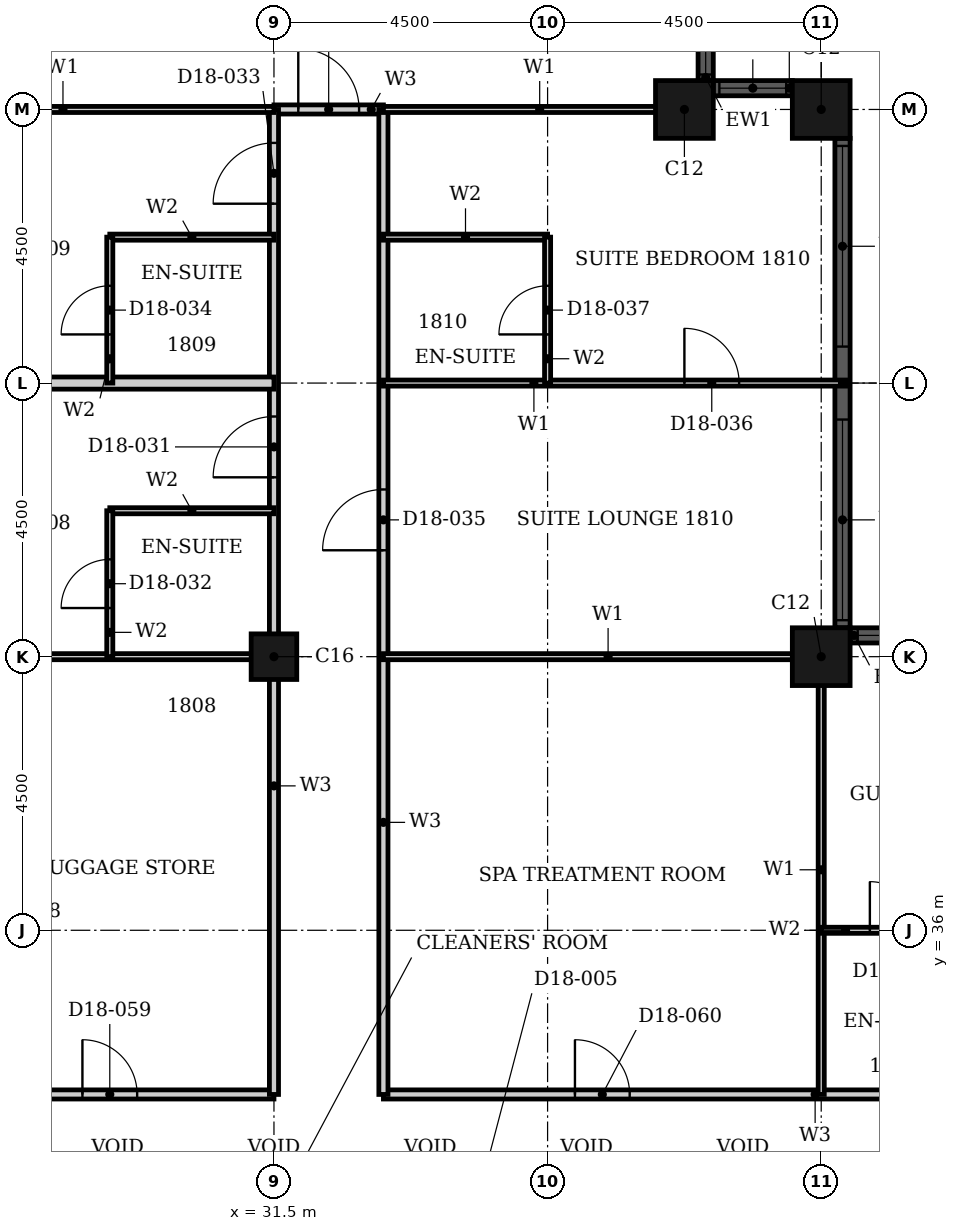
"""IFC4 building model, lengths in metres.
Left out: names, types, materials, properties, quantities, classifications, styles, units other than length and angle.
Written with IfcOpenShell. Run it as: python <this file> out.ifc"""

import sys

from ifc_helpers import new_model, si_unit, direction, frame, frame_2d, origin, origin_2d, place, context, subcontext, project, spatial, rectangle, hollow_rectangle, extrude, element, fill, save


model = new_model("IFC4")
c1 = context("Model", 3, precision=1e-05, world=origin(), true_north=direction((0.0, 1.0)))
c2 = subcontext(c1, "Body", "Model", "MODEL_VIEW")
j1 = project(units=[si_unit("LENGTHUNIT", "METRE"), si_unit("PLANEANGLEUNIT", "RADIAN")], contexts=[c1])
p1 = place(None, origin())
s1 = spatial("IfcSite", under=j1, at=p1, CompositionType="ELEMENT")
p2 = place(p1, origin())
s2 = spatial("IfcBuilding", under=s1, at=p2, CompositionType="ELEMENT")
p3 = place(p2, frame((0.0, 0.0, 78.0)))
s3 = spatial("IfcBuildingStorey", under=s2, at=p3, CompositionType="ELEMENT", Elevation=78.0)
for number, where, z_axis, x_axis in (
    (1, (40.5, 40.5, 0.0), (0.0, 0.0, 1.0), (1.0, 0.0, 0.0)),
    (2, (40.5, 49.5, 0.0), (0.0, 0.0, 1.0), (1.0, 0.0, 0.0)),
    (3, (38.25, 49.5, 0.0), (0.0, 0.0, 1.0), (1.0, 0.0, 0.0)),
):
    element("IfcColumn", number, at=place(p3, frame(where, z_axis=z_axis, x_axis=x_axis)), inside=s3, PredefinedType="COLUMN", context=c2, shape_type="SweptSolid", body=[
        extrude(hollow_rectangle(XDim=0.95, YDim=0.95, WallThickness=0.03, at=origin_2d()), origin(), (0.0, 0.0, 1.0), 3.6),
    ])
p4 = place(p3, frame((31.5, 40.5, 0.0), z_axis=(0.0, 0.0, 1.0), x_axis=(1.0, 0.0, 0.0)))
e4 = element("IfcColumn", 4, at=p4, inside=s3, PredefinedType="COLUMN", context=c2, shape_type="SweptSolid", body=[
    extrude(hollow_rectangle(XDim=0.75, YDim=0.75, WallThickness=0.024, at=origin_2d()), origin(), (0.0, 0.0, 1.0), 3.6),
])
p5 = place(p3, frame((44.525, 40.85, 0.0), z_axis=(0.0, 0.0, 1.0), x_axis=(-1.0, 0.0, 0.0)))
e5 = element("IfcWall", 5, at=p5, inside=s3, PredefinedType="SOLIDWALL", context=c2, shape_type="SweptSolid", body=[
    extrude(rectangle(XDim=3.55, YDim=0.25, at=frame_2d((1.775, 0.0))), origin(), (0.0, 0.0, 1.0), 3.6),
])
p6 = place(p5, frame((0.125, 0.0, 0.9)))
e6 = element("IfcOpeningElement", 6, at=p6, cuts=e5, PredefinedType="OPENING", context=c2, shape_type="SweptSolid", body=[
    extrude(rectangle(XDim=3.3, YDim=2.08, at=frame_2d((1.65, 1.04))), frame((0.0, 0.135, 0.0), z_axis=(0.0, -1.0, 0.0), x_axis=(1.0, 0.0, 0.0)), (0.0, 0.0, 1.0), 0.27),
])
p7 = place(p3, frame((40.85, 40.975, 0.0), z_axis=(0.0, 0.0, 1.0), x_axis=(0.0, 1.0, 0.0)))
e7 = element("IfcWall", 7, at=p7, inside=s3, PredefinedType="SOLIDWALL", context=c2, shape_type="SweptSolid", body=[
    extrude(rectangle(XDim=8.05, YDim=0.25, at=frame_2d((4.025, 0.0))), origin(), (0.0, 0.0, 1.0), 3.6),
])
p8 = place(p7, frame((0.125, 0.0, 0.9)))
e8 = element("IfcOpeningElement", 8, at=p8, cuts=e7, PredefinedType="OPENING", context=c2, shape_type="SweptSolid", body=[
    extrude(rectangle(XDim=3.3, YDim=2.08, at=frame_2d((1.65, 1.04))), frame((0.0, 0.135, 0.0), z_axis=(0.0, -1.0, 0.0), x_axis=(1.0, 0.0, 0.0)), (0.0, 0.0, 1.0), 0.27),
])
p9 = place(p7, frame((4.625, 0.0, 0.9)))
e9 = element("IfcOpeningElement", 9, at=p9, cuts=e7, PredefinedType="OPENING", context=c2, shape_type="SweptSolid", body=[
    extrude(rectangle(XDim=3.3, YDim=2.08, at=frame_2d((1.65, 1.04))), frame((0.0, 0.135, 0.0), z_axis=(0.0, -1.0, 0.0), x_axis=(1.0, 0.0, 0.0)), (0.0, 0.0, 1.0), 0.27),
])
p10 = place(p3, frame((40.025, 49.85, 0.0), z_axis=(0.0, 0.0, 1.0), x_axis=(-1.0, 0.0, 0.0)))
e10 = element("IfcWall", 10, at=p10, inside=s3, PredefinedType="SOLIDWALL", context=c2, shape_type="SweptSolid", body=[
    extrude(rectangle(XDim=1.3, YDim=0.25, at=frame_2d((0.65, 0.0))), origin(), (0.0, 0.0, 1.0), 3.6),
])
p11 = place(p10, frame((0.1, 0.0, 0.9)))
e11 = element("IfcOpeningElement", 11, at=p11, cuts=e10, PredefinedType="OPENING", context=c2, shape_type="SweptSolid", body=[
    extrude(rectangle(XDim=1.1, YDim=2.08, at=frame_2d((0.55, 1.04))), frame((0.0, 0.135, 0.0), z_axis=(0.0, -1.0, 0.0), x_axis=(1.0, 0.0, 0.0)), (0.0, 0.0, 1.0), 0.27),
])
p12 = place(p3, frame((38.6, 49.975, 0.0), z_axis=(0.0, 0.0, 1.0), x_axis=(0.0, 1.0, 0.0)))
e12 = element("IfcWall", 12, at=p12, inside=s3, PredefinedType="SOLIDWALL", context=c2, shape_type="SweptSolid", body=[
    extrude(rectangle(XDim=1.3, YDim=0.25, at=frame_2d((0.65, 0.0))), origin(), (0.0, 0.0, 1.0), 3.6),
])
p13 = place(p12, frame((0.1, 0.0, 0.9)))
e13 = element("IfcOpeningElement", 13, at=p13, cuts=e12, PredefinedType="OPENING", context=c2, shape_type="SweptSolid", body=[
    extrude(rectangle(XDim=1.1, YDim=2.08, at=frame_2d((0.55, 1.04))), frame((0.0, 0.135, 0.0), z_axis=(0.0, -1.0, 0.0), x_axis=(1.0, 0.0, 0.0)), (0.0, 0.0, 1.0), 0.27),
])
p14 = place(p3, frame((16.2, 33.3, 0.0), z_axis=(0.0, 0.0, 1.0), x_axis=(1.0, 0.0, 0.0)))
e14 = element("IfcWall", 14, at=p14, inside=s3, PredefinedType="PARTITIONING", context=c2, shape_type="SweptSolid", body=[
    extrude(rectangle(XDim=15.3, YDim=0.15, at=frame_2d((7.65, 0.0))), origin(), (0.0, 0.0, 1.0), 3.3),
])
p15 = place(p14, frame((4.75, 0.0, 0.0)))
e15 = element("IfcOpeningElement", 15, at=p15, cuts=e14, PredefinedType="OPENING", context=c2, shape_type="SweptSolid", body=[
    extrude(rectangle(XDim=1.0, YDim=2.1, at=frame_2d((0.5, 1.05))), frame((0.0, 0.085, 0.0), z_axis=(0.0, -1.0, 0.0), x_axis=(1.0, 0.0, 0.0)), (0.0, 0.0, 1.0), 0.17),
])
p16 = place(p14, frame((7.65, 0.0, 0.0)))
e16 = element("IfcOpeningElement", 16, at=p16, cuts=e14, PredefinedType="OPENING", context=c2, shape_type="SweptSolid", body=[
    extrude(rectangle(XDim=0.9, YDim=2.1, at=frame_2d((0.45, 1.05))), frame((0.0, 0.085, 0.0), z_axis=(0.0, -1.0, 0.0), x_axis=(1.0, 0.0, 0.0)), (0.0, 0.0, 1.0), 0.17),
])
p17 = place(p14, frame((12.15, 0.0, 0.0)))
e17 = element("IfcOpeningElement", 17, at=p17, cuts=e14, PredefinedType="OPENING", context=c2, shape_type="SweptSolid", body=[
    extrude(rectangle(XDim=0.9, YDim=2.1, at=frame_2d((0.45, 1.05))), frame((0.0, 0.085, 0.0), z_axis=(0.0, -1.0, 0.0), x_axis=(1.0, 0.0, 0.0)), (0.0, 0.0, 1.0), 0.17),
])
p18 = place(p3, frame((33.3, 33.3, 0.0), z_axis=(0.0, 0.0, 1.0), x_axis=(1.0, 0.0, 0.0)))
e18 = element("IfcWall", 18, at=p18, inside=s3, PredefinedType="PARTITIONING", context=c2, shape_type="SweptSolid", body=[
    extrude(rectangle(XDim=13.5, YDim=0.15, at=frame_2d((6.75, 0.0))), origin(), (0.0, 0.0, 1.0), 3.3),
])
p19 = place(p18, frame((10.15, 0.0, 0.0)))
e19 = element("IfcOpeningElement", 19, at=p19, cuts=e18, PredefinedType="OPENING", context=c2, shape_type="SweptSolid", body=[
    extrude(rectangle(XDim=1.0, YDim=2.1, at=frame_2d((0.5, 1.05))), frame((0.0, 0.085, 0.0), z_axis=(0.0, -1.0, 0.0), x_axis=(1.0, 0.0, 0.0)), (0.0, 0.0, 1.0), 0.17),
])
p20 = place(p18, frame((12.15, 0.0, 0.0)))
e20 = element("IfcOpeningElement", 20, at=p20, cuts=e18, PredefinedType="OPENING", context=c2, shape_type="SweptSolid", body=[
    extrude(rectangle(XDim=0.9, YDim=2.1, at=frame_2d((0.45, 1.05))), frame((0.0, 0.085, 0.0), z_axis=(0.0, -1.0, 0.0), x_axis=(1.0, 0.0, 0.0)), (0.0, 0.0, 1.0), 0.17),
])
p21 = place(p18, frame((3.15, 0.0, 0.0)))
e21 = element("IfcOpeningElement", 21, at=p21, cuts=e18, PredefinedType="OPENING", context=c2, shape_type="SweptSolid", body=[
    extrude(rectangle(XDim=0.9, YDim=2.1, at=frame_2d((0.45, 1.05))), frame((0.0, 0.085, 0.0), z_axis=(0.0, -1.0, 0.0), x_axis=(1.0, 0.0, 0.0)), (0.0, 0.0, 1.0), 0.17),
])
p22 = place(p3, frame((31.5, 49.5, 0.0), z_axis=(0.0, 0.0, 1.0), x_axis=(1.0, 0.0, 0.0)))
e22 = element("IfcWall", 22, at=p22, inside=s3, PredefinedType="PARTITIONING", context=c2, shape_type="SweptSolid", body=[
    extrude(rectangle(XDim=1.8, YDim=0.15, at=frame_2d((0.9, 0.0))), origin(), (0.0, 0.0, 1.0), 3.3),
])
p23 = place(p22, frame((0.4, 0.0, 0.0)))
e23 = element("IfcOpeningElement", 23, at=p23, cuts=e22, PredefinedType="OPENING", context=c2, shape_type="SweptSolid", body=[
    extrude(rectangle(XDim=1.0, YDim=2.1, at=frame_2d((0.5, 1.05))), frame((0.0, 0.085, 0.0), z_axis=(0.0, -1.0, 0.0), x_axis=(1.0, 0.0, 0.0)), (0.0, 0.0, 1.0), 0.17),
])
p24 = place(p3, frame((31.5, 33.3, 0.0), z_axis=(0.0, 0.0, 1.0), x_axis=(0.0, 1.0, 0.0)))
e24 = element("IfcWall", 24, at=p24, inside=s3, PredefinedType="PARTITIONING", context=c2, shape_type="SweptSolid", body=[
    extrude(rectangle(XDim=16.2, YDim=0.15, at=frame_2d((8.1, 0.0))), origin(), (0.0, 0.0, 1.0), 2.58),
])
p25 = place(p24, frame((10.15, 0.0, 0.0)))
e25 = element("IfcOpeningElement", 25, at=p25, cuts=e24, PredefinedType="OPENING", context=c2, shape_type="SweptSolid", body=[
    extrude(rectangle(XDim=1.0, YDim=2.1, at=frame_2d((0.5, 1.05))), frame((0.0, 0.085, 0.0), z_axis=(0.0, -1.0, 0.0), x_axis=(1.0, 0.0, 0.0)), (0.0, 0.0, 1.0), 0.17),
])
p26 = place(p24, frame((14.65, 0.0, 0.0)))
e26 = element("IfcOpeningElement", 26, at=p26, cuts=e24, PredefinedType="OPENING", context=c2, shape_type="SweptSolid", body=[
    extrude(rectangle(XDim=1.0, YDim=2.1, at=frame_2d((0.5, 1.05))), frame((0.0, 0.085, 0.0), z_axis=(0.0, -1.0, 0.0), x_axis=(1.0, 0.0, 0.0)), (0.0, 0.0, 1.0), 0.17),
])
p27 = place(p3, frame((33.3, 33.3, 0.0), z_axis=(0.0, 0.0, 1.0), x_axis=(0.0, 1.0, 0.0)))
e27 = element("IfcWall", 27, at=p27, inside=s3, PredefinedType="PARTITIONING", context=c2, shape_type="SweptSolid", body=[
    extrude(rectangle(XDim=16.2, YDim=0.15, at=frame_2d((8.1, 0.0))), origin(), (0.0, 0.0, 1.0), 3.3),
])
p28 = place(p27, frame((8.95, 0.0, 0.0)))
e28 = element("IfcOpeningElement", 28, at=p28, cuts=e27, PredefinedType="OPENING", context=c2, shape_type="SweptSolid", body=[
    extrude(rectangle(XDim=1.0, YDim=2.1, at=frame_2d((0.5, 1.05))), frame((0.0, 0.085, 0.0), z_axis=(0.0, -1.0, 0.0), x_axis=(1.0, 0.0, 0.0)), (0.0, 0.0, 1.0), 0.17),
])
p29 = place(p3, frame((22.31, 40.5, 0.0), z_axis=(0.0, 0.0, 1.0), x_axis=(1.0, 0.0, 0.0)))
e29 = element("IfcWall", 29, at=p29, inside=s3, PredefinedType="PARTITIONING", context=c2, shape_type="SweptSolid", body=[
    extrude(rectangle(XDim=9.19, YDim=0.1, at=frame_2d((4.595, 0.0))), origin(), (0.0, 0.0, 1.0), 2.38),
])
p30 = place(p3, frame((33.3, 40.5, 0.0), z_axis=(0.0, 0.0, 1.0), x_axis=(1.0, 0.0, 0.0)))
e30 = element("IfcWall", 30, at=p30, inside=s3, PredefinedType="PARTITIONING", context=c2, shape_type="SweptSolid", body=[
    extrude(rectangle(XDim=7.39, YDim=0.1, at=frame_2d((3.695, 0.0))), origin(), (0.0, 0.0, 1.0), 2.38),
])
p31 = place(p3, frame((33.3, 45.0, 0.0), z_axis=(0.0, 0.0, 1.0), x_axis=(1.0, 0.0, 0.0)))
e31 = element("IfcWall", 31, at=p31, inside=s3, PredefinedType="PARTITIONING", context=c2, shape_type="SweptSolid", body=[
    extrude(rectangle(XDim=7.615, YDim=0.1, at=frame_2d((3.808, 0.0))), origin(), (0.0, 0.0, 1.0), 3.3),
])
p32 = place(p31, frame((4.95, 0.0, 0.0)))
e32 = element("IfcOpeningElement", 32, at=p32, cuts=e31, PredefinedType="OPENING", context=c2, shape_type="SweptSolid", body=[
    extrude(rectangle(XDim=0.9, YDim=2.1, at=frame_2d((0.45, 1.05))), frame((0.0, 0.06, 0.0), z_axis=(0.0, -1.0, 0.0), x_axis=(1.0, 0.0, 0.0)), (0.0, 0.0, 1.0), 0.12),
])
p33 = place(p3, frame((24.56, 49.5, 0.0), z_axis=(0.0, 0.0, 1.0), x_axis=(1.0, 0.0, 0.0)))
e33 = element("IfcWall", 33, at=p33, inside=s3, PredefinedType="PARTITIONING", context=c2, shape_type="SweptSolid", body=[
    extrude(rectangle(XDim=6.94, YDim=0.1, at=frame_2d((3.47, 0.0))), origin(), (0.0, 0.0, 1.0), 3.3),
])
p34 = place(p3, frame((33.3, 49.5, 0.0), z_axis=(0.0, 0.0, 1.0), x_axis=(1.0, 0.0, 0.0)))
e34 = element("IfcWall", 34, at=p34, inside=s3, PredefinedType="PARTITIONING", context=c2, shape_type="SweptSolid", body=[
    extrude(rectangle(XDim=5.14, YDim=0.1, at=frame_2d((2.57, 0.0))), origin(), (0.0, 0.0, 1.0), 3.3),
])
p35 = place(p3, frame((40.5, 33.3, 0.0), z_axis=(0.0, 0.0, 1.0), x_axis=(0.0, 1.0, 0.0)))
e35 = element("IfcWall", 35, at=p35, inside=s3, PredefinedType="PARTITIONING", context=c2, shape_type="SweptSolid", body=[
    extrude(rectangle(XDim=7.39, YDim=0.1, at=frame_2d((3.695, 0.0))), origin(), (0.0, 0.0, 1.0), 3.3),
])
p36 = place(p3, frame((22.085, 45.0, 0.0), z_axis=(0.0, 0.0, 1.0), x_axis=(1.0, 0.0, 0.0)))
e36 = element("IfcWall", 36, at=p36, inside=s3, PredefinedType="PARTITIONING", context=c2, shape_type="SweptSolid", body=[
    extrude(rectangle(XDim=9.415, YDim=0.2, at=frame_2d((4.708, 0.0))), origin(), (0.0, 0.0, 1.0), 3.3),
])
p37 = place(p3, frame((40.5, 36.0, 0.0), z_axis=(0.0, 0.0, 1.0), x_axis=(1.0, 0.0, 0.0)))
e37 = element("IfcWall", 37, at=p37, inside=s3, PredefinedType="PARTITIONING", context=c2, shape_type="SweptSolid", body=[
    extrude(rectangle(XDim=2.4, YDim=0.1, at=frame_2d((1.2, 0.0))), origin(), (0.0, 0.0, 1.0), 3.3),
])
p38 = place(p37, frame((0.8, 0.0, 0.0)))
e38 = element("IfcOpeningElement", 38, at=p38, cuts=e37, PredefinedType="OPENING", context=c2, shape_type="SweptSolid", body=[
    extrude(rectangle(XDim=0.8, YDim=2.1, at=frame_2d((0.4, 1.05))), frame((0.0, 0.06, 0.0), z_axis=(0.0, -1.0, 0.0), x_axis=(1.0, 0.0, 0.0)), (0.0, 0.0, 1.0), 0.12),
])
for number, where, z_axis, x_axis in (
    (39, (28.8, 42.9, 0.0), (0.0, 0.0, 1.0), (1.0, 0.0, 0.0)),
    (40, (28.8, 47.4, 0.0), (0.0, 0.0, 1.0), (1.0, 0.0, 0.0)),
    (41, (33.3, 47.4, 0.0), (0.0, 0.0, 1.0), (1.0, 0.0, 0.0)),
):
    element("IfcWall", number, at=place(p3, frame(where, z_axis=z_axis, x_axis=x_axis)), inside=s3, PredefinedType="PARTITIONING", context=c2, shape_type="SweptSolid", body=[
        extrude(rectangle(XDim=2.7, YDim=0.1, at=frame_2d((1.35, 0.0))), origin(), (0.0, 0.0, 1.0), 3.3),
    ])
p39 = place(p3, frame((28.8, 40.5, 0.0), z_axis=(0.0, 0.0, 1.0), x_axis=(0.0, 1.0, 0.0)))
e42 = element("IfcWall", 42, at=p39, inside=s3, PredefinedType="PARTITIONING", context=c2, shape_type="SweptSolid", body=[
    extrude(rectangle(XDim=2.4, YDim=0.1, at=frame_2d((1.2, 0.0))), origin(), (0.0, 0.0, 1.0), 3.3),
])
p40 = place(p39, frame((0.8, 0.0, 0.0)))
e43 = element("IfcOpeningElement", 43, at=p40, cuts=e42, PredefinedType="OPENING", context=c2, shape_type="SweptSolid", body=[
    extrude(rectangle(XDim=0.8, YDim=2.1, at=frame_2d((0.4, 1.05))), frame((0.0, 0.06, 0.0), z_axis=(0.0, -1.0, 0.0), x_axis=(1.0, 0.0, 0.0)), (0.0, 0.0, 1.0), 0.12),
])
p41 = place(p3, frame((28.8, 45.0, 0.0), z_axis=(0.0, 0.0, 1.0), x_axis=(0.0, 1.0, 0.0)))
e44 = element("IfcWall", 44, at=p41, inside=s3, PredefinedType="PARTITIONING", context=c2, shape_type="SweptSolid", body=[
    extrude(rectangle(XDim=2.4, YDim=0.1, at=frame_2d((1.2, 0.0))), origin(), (0.0, 0.0, 1.0), 3.3),
])
p42 = place(p41, frame((0.8, 0.0, 0.0)))
e45 = element("IfcOpeningElement", 45, at=p42, cuts=e44, PredefinedType="OPENING", context=c2, shape_type="SweptSolid", body=[
    extrude(rectangle(XDim=0.8, YDim=2.1, at=frame_2d((0.4, 1.05))), frame((0.0, 0.06, 0.0), z_axis=(0.0, -1.0, 0.0), x_axis=(1.0, 0.0, 0.0)), (0.0, 0.0, 1.0), 0.12),
])
p43 = place(p3, frame((36.0, 45.0, 0.0), z_axis=(0.0, 0.0, 1.0), x_axis=(0.0, 1.0, 0.0)))
e46 = element("IfcWall", 46, at=p43, inside=s3, PredefinedType="PARTITIONING", context=c2, shape_type="SweptSolid", body=[
    extrude(rectangle(XDim=2.4, YDim=0.1, at=frame_2d((1.2, 0.0))), origin(), (0.0, 0.0, 1.0), 2.58),
])
p44 = place(p43, frame((0.8, 0.0, 0.0)))
e47 = element("IfcOpeningElement", 47, at=p44, cuts=e46, PredefinedType="OPENING", context=c2, shape_type="SweptSolid", body=[
    extrude(rectangle(XDim=0.8, YDim=2.1, at=frame_2d((0.4, 1.05))), frame((0.0, 0.06, 0.0), z_axis=(0.0, -1.0, 0.0), x_axis=(1.0, 0.0, 0.0)), (0.0, 0.0, 1.0), 0.12),
])
p45 = place(p6, origin())
e48 = element("IfcWindow", 48, at=p45, inside=s3, PartitioningType="SINGLE_PANEL", PredefinedType="WINDOW", context=c2, shape_type="SweptSolid", body=[
    extrude(rectangle(XDim=3.3, YDim=2.08, at=frame_2d((1.65, 1.04))), frame((0.0, 0.03, 0.0), z_axis=(0.0, -1.0, 0.0), x_axis=(1.0, 0.0, 0.0)), (0.0, 0.0, 1.0), 0.06),
])
fill(e6, e48)
p46 = place(p8, origin())
e49 = element("IfcWindow", 49, at=p46, inside=s3, PartitioningType="SINGLE_PANEL", PredefinedType="WINDOW", context=c2, shape_type="SweptSolid", body=[
    extrude(rectangle(XDim=3.3, YDim=2.08, at=frame_2d((1.65, 1.04))), frame((0.0, 0.03, 0.0), z_axis=(0.0, -1.0, 0.0), x_axis=(1.0, 0.0, 0.0)), (0.0, 0.0, 1.0), 0.06),
])
fill(e8, e49)
p47 = place(p9, origin())
e50 = element("IfcWindow", 50, at=p47, inside=s3, PartitioningType="SINGLE_PANEL", PredefinedType="WINDOW", context=c2, shape_type="SweptSolid", body=[
    extrude(rectangle(XDim=3.3, YDim=2.08, at=frame_2d((1.65, 1.04))), frame((0.0, 0.03, 0.0), z_axis=(0.0, -1.0, 0.0), x_axis=(1.0, 0.0, 0.0)), (0.0, 0.0, 1.0), 0.06),
])
fill(e9, e50)
p48 = place(p11, origin())
e51 = element("IfcWindow", 51, at=p48, inside=s3, PartitioningType="SINGLE_PANEL", PredefinedType="WINDOW", context=c2, shape_type="SweptSolid", body=[
    extrude(rectangle(XDim=1.1, YDim=2.08, at=frame_2d((0.55, 1.04))), frame((0.0, 0.03, 0.0), z_axis=(0.0, -1.0, 0.0), x_axis=(1.0, 0.0, 0.0)), (0.0, 0.0, 1.0), 0.06),
])
fill(e11, e51)
p49 = place(p13, origin())
e52 = element("IfcWindow", 52, at=p49, inside=s3, PartitioningType="SINGLE_PANEL", PredefinedType="WINDOW", context=c2, shape_type="SweptSolid", body=[
    extrude(rectangle(XDim=1.1, YDim=2.08, at=frame_2d((0.55, 1.04))), frame((0.0, 0.03, 0.0), z_axis=(0.0, -1.0, 0.0), x_axis=(1.0, 0.0, 0.0)), (0.0, 0.0, 1.0), 0.06),
])
fill(e13, e52)
p50 = place(p25, origin())
e53 = element("IfcDoor", 53, at=p50, inside=s3, OperationType="SINGLE_SWING_RIGHT", PredefinedType="DOOR", context=c2, shape_type="SweptSolid", body=[
    extrude(rectangle(XDim=1.0, YDim=2.1, at=frame_2d((0.5, 1.05))), frame((0.0, 0.025, 0.0), z_axis=(0.0, -1.0, 0.0), x_axis=(1.0, 0.0, 0.0)), (0.0, 0.0, 1.0), 0.05),
])
fill(e25, e53)
p51 = place(p40, origin())
e54 = element("IfcDoor", 54, at=p51, inside=s3, OperationType="SINGLE_SWING_LEFT", PredefinedType="DOOR", context=c2, shape_type="SweptSolid", body=[
    extrude(rectangle(XDim=0.8, YDim=2.1, at=frame_2d((0.4, 1.05))), frame((0.0, 0.025, 0.0), z_axis=(0.0, -1.0, 0.0), x_axis=(1.0, 0.0, 0.0)), (0.0, 0.0, 1.0), 0.05),
])
fill(e43, e54)
p52 = place(p26, origin())
e55 = element("IfcDoor", 55, at=p52, inside=s3, OperationType="SINGLE_SWING_RIGHT", PredefinedType="DOOR", context=c2, shape_type="SweptSolid", body=[
    extrude(rectangle(XDim=1.0, YDim=2.1, at=frame_2d((0.5, 1.05))), frame((0.0, 0.025, 0.0), z_axis=(0.0, -1.0, 0.0), x_axis=(1.0, 0.0, 0.0)), (0.0, 0.0, 1.0), 0.05),
])
fill(e26, e55)
p53 = place(p42, origin())
e56 = element("IfcDoor", 56, at=p53, inside=s3, OperationType="SINGLE_SWING_LEFT", PredefinedType="DOOR", context=c2, shape_type="SweptSolid", body=[
    extrude(rectangle(XDim=0.8, YDim=2.1, at=frame_2d((0.4, 1.05))), frame((0.0, 0.025, 0.0), z_axis=(0.0, -1.0, 0.0), x_axis=(1.0, 0.0, 0.0)), (0.0, 0.0, 1.0), 0.05),
])
fill(e45, e56)
p54 = place(p28, origin())
e57 = element("IfcDoor", 57, at=p54, inside=s3, OperationType="SINGLE_SWING_LEFT", PredefinedType="DOOR", context=c2, shape_type="SweptSolid", body=[
    extrude(rectangle(XDim=1.0, YDim=2.1, at=frame_2d((0.5, 1.05))), frame((0.0, 0.025, 0.0), z_axis=(0.0, -1.0, 0.0), x_axis=(1.0, 0.0, 0.0)), (0.0, 0.0, 1.0), 0.05),
])
fill(e28, e57)
p55 = place(p32, origin())
e58 = element("IfcDoor", 58, at=p55, inside=s3, OperationType="SINGLE_SWING_RIGHT", PredefinedType="DOOR", context=c2, shape_type="SweptSolid", body=[
    extrude(rectangle(XDim=0.9, YDim=2.1, at=frame_2d((0.45, 1.05))), frame((0.0, 0.025, 0.0), z_axis=(0.0, -1.0, 0.0), x_axis=(1.0, 0.0, 0.0)), (0.0, 0.0, 1.0), 0.05),
])
fill(e32, e58)
p56 = place(p44, origin())
e59 = element("IfcDoor", 59, at=p56, inside=s3, OperationType="SINGLE_SWING_LEFT", PredefinedType="DOOR", context=c2, shape_type="SweptSolid", body=[
    extrude(rectangle(XDim=0.8, YDim=2.1, at=frame_2d((0.4, 1.05))), frame((0.0, 0.025, 0.0), z_axis=(0.0, -1.0, 0.0), x_axis=(1.0, 0.0, 0.0)), (0.0, 0.0, 1.0), 0.05),
])
fill(e47, e59)
p57 = place(p23, origin())
e60 = element("IfcDoor", 60, at=p57, inside=s3, OperationType="SINGLE_SWING_RIGHT", PredefinedType="DOOR", context=c2, shape_type="SweptSolid", body=[
    extrude(rectangle(XDim=1.0, YDim=2.1, at=frame_2d((0.5, 1.05))), frame((0.0, 0.025, 0.0), z_axis=(0.0, -1.0, 0.0), x_axis=(1.0, 0.0, 0.0)), (0.0, 0.0, 1.0), 0.05),
])
fill(e23, e60)
p58 = place(p38, origin())
e61 = element("IfcDoor", 61, at=p58, inside=s3, OperationType="SINGLE_SWING_LEFT", PredefinedType="DOOR", context=c2, shape_type="SweptSolid", body=[
    extrude(rectangle(XDim=0.8, YDim=2.1, at=frame_2d((0.4, 1.05))), frame((0.0, 0.025, 0.0), z_axis=(0.0, -1.0, 0.0), x_axis=(1.0, 0.0, 0.0)), (0.0, 0.0, 1.0), 0.05),
])
fill(e38, e61)
p59 = place(p17, origin())
e62 = element("IfcDoor", 62, at=p59, inside=s3, OperationType="SINGLE_SWING_LEFT", PredefinedType="DOOR", context=c2, shape_type="SweptSolid", body=[
    extrude(rectangle(XDim=0.9, YDim=2.1, at=frame_2d((0.45, 1.05))), frame((0.0, 0.025, 0.0), z_axis=(0.0, -1.0, 0.0), x_axis=(1.0, 0.0, 0.0)), (0.0, 0.0, 1.0), 0.05),
])
fill(e17, e62)
p60 = place(p21, origin())
e63 = element("IfcDoor", 63, at=p60, inside=s3, OperationType="SINGLE_SWING_LEFT", PredefinedType="DOOR", context=c2, shape_type="SweptSolid", body=[
    extrude(rectangle(XDim=0.9, YDim=2.1, at=frame_2d((0.45, 1.05))), frame((0.0, 0.025, 0.0), z_axis=(0.0, -1.0, 0.0), x_axis=(1.0, 0.0, 0.0)), (0.0, 0.0, 1.0), 0.05),
])
fill(e21, e63)
save(model, sys.argv[1])
